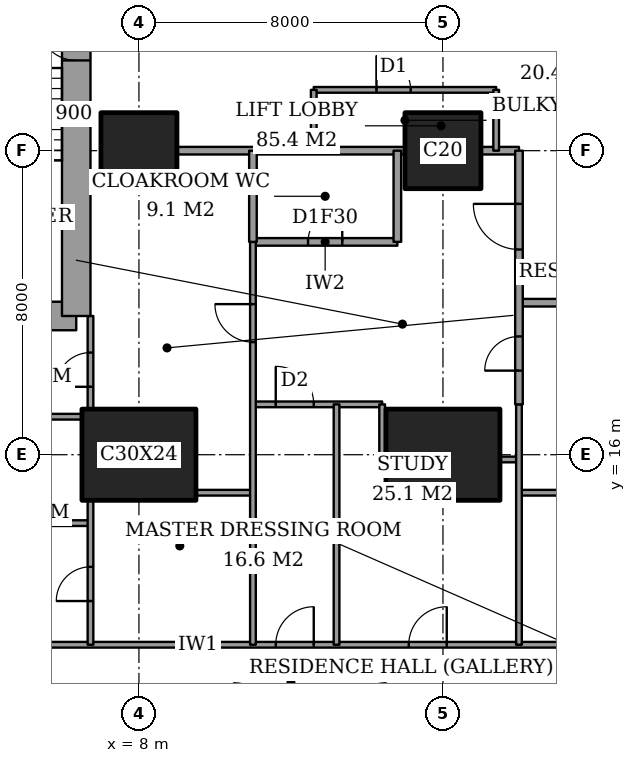
"""IFC4 building model, lengths in metres.
Left out: names, types, materials, properties, quantities, classifications, styles, units other than length and angle.
Written with IfcOpenShell. Run it as: python <this file> out.ifc"""

import sys

from ifc_helpers import new_model, si_unit, direction, frame, frame_2d, origin, origin_2d, place, context, subcontext, project, spatial, rectangle, extrude, element, fill, save


model = new_model("IFC4")
c1 = context("Model", 3, precision=1e-05, world=origin(), true_north=direction((0.0, 1.0)))
c2 = subcontext(c1, "Body", "Model", "MODEL_VIEW")
j1 = project(units=[si_unit("LENGTHUNIT", "METRE"), si_unit("PLANEANGLEUNIT", "RADIAN")], contexts=[c1])
p1 = place(None, origin())
s1 = spatial("IfcSite", under=j1, at=p1, CompositionType="ELEMENT")
p2 = place(p1, origin())
s2 = spatial("IfcBuilding", under=s1, at=p2, CompositionType="ELEMENT")
p3 = place(p2, frame((0.0, 0.0, 69.2)))
s3 = spatial("IfcBuildingStorey", under=s2, at=p3, CompositionType="ELEMENT", Elevation=69.2)
p4 = place(p3, frame((8.0, 16.0, 0.0), z_axis=(0.0, 0.0, 1.0), x_axis=(1.0, 0.0, 0.0)))
e1 = element("IfcColumn", 1, at=p4, inside=s3, PredefinedType="COLUMN", context=c2, shape_type="SweptSolid", body=[
    extrude(rectangle(XDim=3.0, YDim=2.4, at=origin_2d()), origin(), (0.0, 0.0, 1.0), 3.6),
])
p5 = place(p3, frame((8.0, 24.0, 0.0), z_axis=(0.0, 0.0, 1.0), x_axis=(1.0, 0.0, 0.0)))
e2 = element("IfcColumn", 2, at=p5, inside=s3, PredefinedType="COLUMN", context=c2, shape_type="SweptSolid", body=[
    extrude(rectangle(XDim=2.0, YDim=2.0, at=origin_2d()), origin(), (0.0, 0.0, 1.0), 3.6),
])
p6 = place(p3, frame((16.0, 16.0, 0.0), z_axis=(0.0, 0.0, 1.0), x_axis=(1.0, 0.0, 0.0)))
e3 = element("IfcColumn", 3, at=p6, inside=s3, PredefinedType="COLUMN", context=c2, shape_type="SweptSolid", body=[
    extrude(rectangle(XDim=3.0, YDim=2.4, at=origin_2d()), origin(), (0.0, 0.0, 1.0), 3.6),
])
p7 = place(p3, frame((16.0, 24.0, 0.0), z_axis=(0.0, 0.0, 1.0), x_axis=(1.0, 0.0, 0.0)))
e4 = element("IfcColumn", 4, at=p7, inside=s3, PredefinedType="COLUMN", context=c2, shape_type="SweptSolid", body=[
    extrude(rectangle(XDim=2.0, YDim=2.0, at=origin_2d()), origin(), (0.0, 0.0, 1.0), 3.6),
])
p8 = place(p3, frame((1.9, 19.65, 0.0), z_axis=(0.0, 0.0, 1.0), x_axis=(1.0, 0.0, 0.0)))
e5 = element("IfcWall", 5, at=p8, inside=s3, PredefinedType="SHEAR", context=c2, shape_type="SweptSolid", body=[
    extrude(rectangle(XDim=4.45, YDim=0.75, at=frame_2d((2.225, 0.0))), origin(), (0.0, 0.0, 1.0), 3.6),
])
p9 = place(p3, frame((6.35, 19.65, 0.0), z_axis=(0.0, 0.0, 1.0), x_axis=(0.0, 1.0, 0.0)))
e6 = element("IfcWall", 6, at=p9, inside=s3, PredefinedType="SHEAR", context=c2, shape_type="SweptSolid", body=[
    extrude(rectangle(XDim=8.7, YDim=0.75, at=frame_2d((4.35, 0.0))), origin(), (0.0, 0.0, 1.0), 3.6),
])
p10 = place(p9, frame((6.725, 0.0, 0.0)))
e7 = element("IfcOpeningElement", 7, at=p10, cuts=e6, PredefinedType="OPENING", context=c2, shape_type="SweptSolid", body=[
    extrude(rectangle(XDim=1.0, YDim=2.1, at=frame_2d((0.5, 1.05))), frame((0.0, 0.385, 0.0), z_axis=(0.0, -1.0, 0.0), x_axis=(1.0, 0.0, 0.0)), (0.0, 0.0, 1.0), 0.77),
])
p11 = place(p3, frame((-0.45, 11.0, 0.0), z_axis=(0.0, 0.0, 1.0), x_axis=(1.0, 0.0, 0.0)))
e8 = element("IfcWall", 8, at=p11, inside=s3, PredefinedType="PARTITIONING", context=c2, shape_type="SweptSolid", body=[
    extrude(rectangle(XDim=25.011, YDim=0.15, at=frame_2d((12.505, 0.0))), origin(), (0.0, 0.0, 1.0), 3.35),
])
p12 = place(p11, frame((12.05, 0.0, 0.0)))
e9 = element("IfcOpeningElement", 9, at=p12, cuts=e8, PredefinedType="OPENING", context=c2, shape_type="SweptSolid", body=[
    extrude(rectangle(XDim=1.0, YDim=2.1, at=frame_2d((0.5, 1.05))), frame((0.0, 0.085, 0.0), z_axis=(0.0, -1.0, 0.0), x_axis=(1.0, 0.0, 0.0)), (0.0, 0.0, 1.0), 0.17),
])
p13 = place(p11, frame((3.087, 0.0, 0.0)))
e10 = element("IfcOpeningElement", 10, at=p13, cuts=e8, PredefinedType="OPENING", context=c2, shape_type="SweptSolid", body=[
    extrude(rectangle(XDim=1.0, YDim=2.1, at=frame_2d((0.5, 1.05))), frame((0.0, 0.085, 0.0), z_axis=(0.0, -1.0, 0.0), x_axis=(1.0, 0.0, 0.0)), (0.0, 0.0, 1.0), 0.17),
])
p14 = place(p11, frame((15.55, 0.0, 0.0)))
e11 = element("IfcOpeningElement", 11, at=p14, cuts=e8, PredefinedType="OPENING", context=c2, shape_type="SweptSolid", body=[
    extrude(rectangle(XDim=1.0, YDim=2.1, at=frame_2d((0.5, 1.05))), frame((0.0, 0.085, 0.0), z_axis=(0.0, -1.0, 0.0), x_axis=(1.0, 0.0, 0.0)), (0.0, 0.0, 1.0), 0.17),
])
p15 = place(p11, frame((21.175, 0.0, 0.0)))
e12 = element("IfcOpeningElement", 12, at=p15, cuts=e8, PredefinedType="OPENING", context=c2, shape_type="SweptSolid", body=[
    extrude(rectangle(XDim=1.0, YDim=2.1, at=frame_2d((0.5, 1.05))), frame((0.0, 0.085, 0.0), z_axis=(0.0, -1.0, 0.0), x_axis=(1.0, 0.0, 0.0)), (0.0, 0.0, 1.0), 0.17),
])
p16 = place(p3, frame((4.125, 14.2, 0.0), z_axis=(0.0, 0.0, 1.0), x_axis=(1.0, 0.0, 0.0)))
e13 = element("IfcWall", 13, at=p16, inside=s3, PredefinedType="PARTITIONING", context=c2, shape_type="SweptSolid", body=[
    extrude(rectangle(XDim=2.6, YDim=0.15, at=frame_2d((1.3, 0.0))), origin(), (0.0, 0.0, 1.0), 3.35),
])
p17 = place(p3, frame((9.5, 15.0, 0.0), z_axis=(0.0, 0.0, 1.0), x_axis=(1.0, 0.0, 0.0)))
e14 = element("IfcWall", 14, at=p17, inside=s3, PredefinedType="PARTITIONING", context=c2, shape_type="SweptSolid", body=[
    extrude(rectangle(XDim=1.5, YDim=0.15, at=frame_2d((0.75, 0.0))), origin(), (0.0, 0.0, 1.0), 3.35),
])
p18 = place(p3, frame((18.0, 15.0, 0.0), z_axis=(0.0, 0.0, 1.0), x_axis=(1.0, 0.0, 0.0)))
e15 = element("IfcWall", 15, at=p18, inside=s3, PredefinedType="PARTITIONING", context=c2, shape_type="SweptSolid", body=[
    extrude(rectangle(XDim=6.0, YDim=0.15, at=frame_2d((3.0, 0.0))), origin(), (0.0, 0.0, 1.0), 3.35),
])
p19 = place(p3, frame((17.5, 15.875, 0.0), z_axis=(0.0, 0.0, 1.0), x_axis=(1.0, 0.0, 0.0)))
e16 = element("IfcWall", 16, at=p19, inside=s3, PredefinedType="PARTITIONING", context=c2, shape_type="SweptSolid", body=[
    extrude(rectangle(XDim=0.5, YDim=0.15, at=frame_2d((0.25, 0.0))), origin(), (0.0, 0.0, 1.0), 2.634),
])
p20 = place(p3, frame((1.35, 17.0, 0.0), z_axis=(0.0, 0.0, 1.0), x_axis=(1.0, 0.0, 0.0)))
e17 = element("IfcWall", 17, at=p20, inside=s3, PredefinedType="PARTITIONING", context=c2, shape_type="SweptSolid", body=[
    extrude(rectangle(XDim=5.15, YDim=0.15, at=frame_2d((2.575, 0.0))), origin(), (0.0, 0.0, 1.0), 3.35),
])
p21 = place(p3, frame((11.0, 17.325, 0.0), z_axis=(0.0, 0.0, 1.0), x_axis=(1.0, 0.0, 0.0)))
e18 = element("IfcWall", 18, at=p21, inside=s3, PredefinedType="PARTITIONING", context=c2, shape_type="SweptSolid", body=[
    extrude(rectangle(XDim=3.4, YDim=0.15, at=frame_2d((1.7, 0.0))), origin(), (0.0, 0.0, 1.0), 3.35),
])
p22 = place(p21, frame((0.6, 0.0, 0.0)))
e19 = element("IfcOpeningElement", 19, at=p22, cuts=e18, PredefinedType="OPENING", context=c2, shape_type="SweptSolid", body=[
    extrude(rectangle(XDim=1.0, YDim=2.1, at=frame_2d((0.5, 1.05))), frame((0.0, 0.085, 0.0), z_axis=(0.0, -1.0, 0.0), x_axis=(1.0, 0.0, 0.0)), (0.0, 0.0, 1.0), 0.17),
])
p23 = place(p3, frame((18.0, 20.0, 0.0), z_axis=(0.0, 0.0, 1.0), x_axis=(1.0, 0.0, 0.0)))
e20 = element("IfcWall", 20, at=p23, inside=s3, PredefinedType="PARTITIONING", context=c2, shape_type="SweptSolid", body=[
    extrude(rectangle(XDim=6.0, YDim=0.2, at=frame_2d((3.0, 0.0))), origin(), (0.0, 0.0, 1.0), 3.35),
])
p24 = place(p3, frame((11.0, 21.6, 0.0), z_axis=(0.0, 0.0, 1.0), x_axis=(1.0, 0.0, 0.0)))
e21 = element("IfcWall", 21, at=p24, inside=s3, PredefinedType="PARTITIONING", context=c2, shape_type="SweptSolid", body=[
    extrude(rectangle(XDim=3.8, YDim=0.2, at=frame_2d((1.9, 0.0))), origin(), (0.0, 0.0, 1.0), 3.35),
])
p25 = place(p24, frame((1.45, 0.0, 0.0)))
e22 = element("IfcOpeningElement", 22, at=p25, cuts=e21, PredefinedType="OPENING", context=c2, shape_type="SweptSolid", body=[
    extrude(rectangle(XDim=0.9, YDim=2.1, at=frame_2d((0.45, 1.05))), frame((0.0, 0.11, 0.0), z_axis=(0.0, -1.0, 0.0), x_axis=(1.0, 0.0, 0.0)), (0.0, 0.0, 1.0), 0.22),
])
p26 = place(p3, frame((9.0, 24.0, 0.0), z_axis=(0.0, 0.0, 1.0), x_axis=(1.0, 0.0, 0.0)))
e23 = element("IfcWall", 23, at=p26, inside=s3, PredefinedType="PARTITIONING", context=c2, shape_type="SweptSolid", body=[
    extrude(rectangle(XDim=6.0, YDim=0.2, at=frame_2d((3.0, 0.0))), origin(), (0.0, 0.0, 1.0), 3.35),
])
p27 = place(p3, frame((17.0, 24.0, 0.0), z_axis=(0.0, 0.0, 1.0), x_axis=(1.0, 0.0, 0.0)))
e24 = element("IfcWall", 24, at=p27, inside=s3, PredefinedType="PARTITIONING", context=c2, shape_type="SweptSolid", body=[
    extrude(rectangle(XDim=1.0, YDim=0.2, at=frame_2d((0.5, 0.0))), origin(), (0.0, 0.0, 1.0), 3.35),
])
p28 = place(p3, frame((12.6, 25.6, 0.0), z_axis=(0.0, 0.0, 1.0), x_axis=(1.0, 0.0, 0.0)))
e25 = element("IfcWall", 25, at=p28, inside=s3, PredefinedType="PARTITIONING", context=c2, shape_type="SweptSolid", body=[
    extrude(rectangle(XDim=4.8, YDim=0.15, at=frame_2d((2.4, 0.0))), origin(), (0.0, 0.0, 1.0), 3.35),
])
p29 = place(p28, frame((1.65, 0.0, 0.0)))
e26 = element("IfcOpeningElement", 26, at=p29, cuts=e25, PredefinedType="OPENING", context=c2, shape_type="SweptSolid", body=[
    extrude(rectangle(XDim=0.9, YDim=2.1, at=frame_2d((0.45, 1.05))), frame((0.0, 0.085, 0.0), z_axis=(0.0, -1.0, 0.0), x_axis=(1.0, 0.0, 0.0)), (0.0, 0.0, 1.0), 0.17),
])
p30 = place(p3, frame((6.725, 11.0, 0.0), z_axis=(0.0, 0.0, 1.0), x_axis=(0.0, 1.0, 0.0)))
e27 = element("IfcWall", 27, at=p30, inside=s3, PredefinedType="PARTITIONING", context=c2, shape_type="SweptSolid", body=[
    extrude(rectangle(XDim=3.8, YDim=0.15, at=frame_2d((1.9, 0.0))), origin(), (0.0, 0.0, 1.0), 3.35),
])
p31 = place(p30, frame((1.15, 0.0, 0.0)))
e28 = element("IfcOpeningElement", 28, at=p31, cuts=e27, PredefinedType="OPENING", context=c2, shape_type="SweptSolid", body=[
    extrude(rectangle(XDim=0.9, YDim=2.1, at=frame_2d((0.45, 1.05))), frame((0.0, 0.085, 0.0), z_axis=(0.0, -1.0, 0.0), x_axis=(1.0, 0.0, 0.0)), (0.0, 0.0, 1.0), 0.17),
])
p32 = place(p3, frame((6.725, 17.2, 0.0), z_axis=(0.0, 0.0, 1.0), x_axis=(0.0, 1.0, 0.0)))
e29 = element("IfcWall", 29, at=p32, inside=s3, PredefinedType="PARTITIONING", context=c2, shape_type="SweptSolid", body=[
    extrude(rectangle(XDim=2.45, YDim=0.15, at=frame_2d((1.225, 0.0))), origin(), (0.0, 0.0, 1.0), 3.35),
])
p33 = place(p32, frame((0.587, 0.0, 0.0)))
e30 = element("IfcOpeningElement", 30, at=p33, cuts=e29, PredefinedType="OPENING", context=c2, shape_type="SweptSolid", body=[
    extrude(rectangle(XDim=0.9, YDim=2.1, at=frame_2d((0.45, 1.05))), frame((0.0, 0.085, 0.0), z_axis=(0.0, -1.0, 0.0), x_axis=(1.0, 0.0, 0.0)), (0.0, 0.0, 1.0), 0.17),
])
p34 = place(p3, frame((11.0, 21.6, 0.0), z_axis=(0.0, 0.0, 1.0), x_axis=(0.0, 1.0, 0.0)))
e31 = element("IfcWall", 31, at=p34, inside=s3, PredefinedType="PARTITIONING", context=c2, shape_type="SweptSolid", body=[
    extrude(rectangle(XDim=2.4, YDim=0.2, at=frame_2d((1.2, 0.0))), origin(), (0.0, 0.0, 1.0), 3.35),
])
p35 = place(p3, frame((11.0, 11.0, 0.0), z_axis=(0.0, 0.0, 1.0), x_axis=(0.0, 1.0, 0.0)))
e32 = element("IfcWall", 32, at=p35, inside=s3, PredefinedType="PARTITIONING", context=c2, shape_type="SweptSolid", body=[
    extrude(rectangle(XDim=10.6, YDim=0.15, at=frame_2d((5.3, 0.0))), origin(), (0.0, 0.0, 1.0), 3.35),
])
p36 = place(p35, frame((7.962, 0.0, 0.0)))
e33 = element("IfcOpeningElement", 33, at=p36, cuts=e32, PredefinedType="OPENING", context=c2, shape_type="SweptSolid", body=[
    extrude(rectangle(XDim=1.0, YDim=2.1, at=frame_2d((0.5, 1.05))), frame((0.0, 0.085, 0.0), z_axis=(0.0, -1.0, 0.0), x_axis=(1.0, 0.0, 0.0)), (0.0, 0.0, 1.0), 0.17),
])
p37 = place(p3, frame((12.6, 24.0, 0.0), z_axis=(0.0, 0.0, 1.0), x_axis=(0.0, 1.0, 0.0)))
e34 = element("IfcWall", 34, at=p37, inside=s3, PredefinedType="PARTITIONING", context=c2, shape_type="SweptSolid", body=[
    extrude(rectangle(XDim=1.6, YDim=0.15, at=frame_2d((0.8, 0.0))), origin(), (0.0, 0.0, 1.0), 3.35),
])
p38 = place(p3, frame((13.2, 11.0, 0.0), z_axis=(0.0, 0.0, 1.0), x_axis=(0.0, 1.0, 0.0)))
e35 = element("IfcWall", 35, at=p38, inside=s3, PredefinedType="PARTITIONING", context=c2, shape_type="SweptSolid", body=[
    extrude(rectangle(XDim=6.325, YDim=0.15, at=frame_2d((3.163, 0.0))), origin(), (0.0, 0.0, 1.0), 3.35),
])
p39 = place(p3, frame((14.4, 15.875, 0.0), z_axis=(0.0, 0.0, 1.0), x_axis=(0.0, 1.0, 0.0)))
e36 = element("IfcWall", 36, at=p39, inside=s3, PredefinedType="PARTITIONING", context=c2, shape_type="SweptSolid", body=[
    extrude(rectangle(XDim=1.45, YDim=0.15, at=frame_2d((0.725, 0.0))), origin(), (0.0, 0.0, 1.0), 3.35),
])
p40 = place(p3, frame((14.8, 21.6, 0.0), z_axis=(0.0, 0.0, 1.0), x_axis=(0.0, 1.0, 0.0)))
e37 = element("IfcWall", 37, at=p40, inside=s3, PredefinedType="PARTITIONING", context=c2, shape_type="SweptSolid", body=[
    extrude(rectangle(XDim=2.4, YDim=0.2, at=frame_2d((1.2, 0.0))), origin(), (0.0, 0.0, 1.0), 3.35),
])
p41 = place(p3, frame((17.4, 24.0, 0.0), z_axis=(0.0, 0.0, 1.0), x_axis=(0.0, 1.0, 0.0)))
e38 = element("IfcWall", 38, at=p41, inside=s3, PredefinedType="PARTITIONING", context=c2, shape_type="SweptSolid", body=[
    extrude(rectangle(XDim=1.6, YDim=0.15, at=frame_2d((0.8, 0.0))), origin(), (0.0, 0.0, 1.0), 3.35),
])
p42 = place(p3, frame((18.0, 17.325, 0.0), z_axis=(0.0, 0.0, 1.0), x_axis=(0.0, 1.0, 0.0)))
e39 = element("IfcWall", 39, at=p42, inside=s3, PredefinedType="PARTITIONING", context=c2, shape_type="SweptSolid", body=[
    extrude(rectangle(XDim=6.675, YDim=0.2, at=frame_2d((3.337, 0.0))), origin(), (0.0, 0.0, 1.0), 3.35),
])
p43 = place(p42, frame((4.075, 0.0, 0.0)))
e40 = element("IfcOpeningElement", 40, at=p43, cuts=e39, PredefinedType="OPENING", context=c2, shape_type="SweptSolid", body=[
    extrude(rectangle(XDim=1.2, YDim=2.4, at=frame_2d((0.6, 1.2))), frame((0.0, 0.11, 0.0), z_axis=(0.0, -1.0, 0.0), x_axis=(1.0, 0.0, 0.0)), (0.0, 0.0, 1.0), 0.22),
])
p44 = place(p42, frame((0.887, 0.0, 0.0)))
e41 = element("IfcOpeningElement", 41, at=p44, cuts=e39, PredefinedType="OPENING", context=c2, shape_type="SweptSolid", body=[
    extrude(rectangle(XDim=0.9, YDim=2.1, at=frame_2d((0.45, 1.05))), frame((0.0, 0.11, 0.0), z_axis=(0.0, -1.0, 0.0), x_axis=(1.0, 0.0, 0.0)), (0.0, 0.0, 1.0), 0.22),
])
p45 = place(p3, frame((18.0, 11.0, 0.0), z_axis=(0.0, 0.0, 1.0), x_axis=(0.0, 1.0, 0.0)))
e42 = element("IfcWall", 42, at=p45, inside=s3, PredefinedType="PARTITIONING", context=c2, shape_type="SweptSolid", body=[
    extrude(rectangle(XDim=6.325, YDim=0.15, at=frame_2d((3.163, 0.0))), origin(), (0.0, 0.0, 1.0), 3.35),
])
p46 = place(p12, origin())
e43 = element("IfcDoor", 43, at=p46, inside=s3, OperationType="SINGLE_SWING_LEFT", PredefinedType="DOOR", context=c2, shape_type="SweptSolid", body=[
    extrude(rectangle(XDim=1.0, YDim=2.1, at=frame_2d((0.5, 1.05))), frame((0.0, 0.025, 0.0), z_axis=(0.0, -1.0, 0.0), x_axis=(1.0, 0.0, 0.0)), (0.0, 0.0, 1.0), 0.05),
])
fill(e9, e43)
p47 = place(p33, origin())
e44 = element("IfcDoor", 44, at=p47, inside=s3, OperationType="SINGLE_SWING_RIGHT", PredefinedType="DOOR", context=c2, shape_type="SweptSolid", body=[
    extrude(rectangle(XDim=0.9, YDim=2.1, at=frame_2d((0.45, 1.05))), frame((0.0, 0.025, 0.0), z_axis=(0.0, -1.0, 0.0), x_axis=(1.0, 0.0, 0.0)), (0.0, 0.0, 1.0), 0.05),
])
fill(e30, e44)
p48 = place(p31, origin())
e45 = element("IfcDoor", 45, at=p48, inside=s3, OperationType="SINGLE_SWING_RIGHT", PredefinedType="DOOR", context=c2, shape_type="SweptSolid", body=[
    extrude(rectangle(XDim=0.9, YDim=2.1, at=frame_2d((0.45, 1.05))), frame((0.0, 0.025, 0.0), z_axis=(0.0, -1.0, 0.0), x_axis=(1.0, 0.0, 0.0)), (0.0, 0.0, 1.0), 0.05),
])
fill(e28, e45)
p49 = place(p36, origin())
e46 = element("IfcDoor", 46, at=p49, inside=s3, OperationType="SINGLE_SWING_LEFT", PredefinedType="DOOR", context=c2, shape_type="SweptSolid", body=[
    extrude(rectangle(XDim=1.0, YDim=2.1, at=frame_2d((0.5, 1.05))), frame((0.0, 0.025, 0.0), z_axis=(0.0, -1.0, 0.0), x_axis=(1.0, 0.0, 0.0)), (0.0, 0.0, 1.0), 0.05),
])
fill(e33, e46)
p50 = place(p25, origin())
e47 = element("IfcDoor", 47, at=p50, inside=s3, OperationType="SINGLE_SWING_LEFT", PredefinedType="DOOR", context=c2, shape_type="SweptSolid", body=[
    extrude(rectangle(XDim=0.9, YDim=2.1, at=frame_2d((0.45, 1.05))), frame((0.0, 0.025, 0.0), z_axis=(0.0, -1.0, 0.0), x_axis=(1.0, 0.0, 0.0)), (0.0, 0.0, 1.0), 0.05),
])
fill(e22, e47)
p51 = place(p43, origin())
e48 = element("IfcDoor", 48, at=p51, inside=s3, OperationType="SINGLE_SWING_LEFT", PredefinedType="DOOR", context=c2, shape_type="SweptSolid", body=[
    extrude(rectangle(XDim=1.2, YDim=2.4, at=frame_2d((0.6, 1.2))), frame((0.0, 0.025, 0.0), z_axis=(0.0, -1.0, 0.0), x_axis=(1.0, 0.0, 0.0)), (0.0, 0.0, 1.0), 0.05),
])
fill(e40, e48)
p52 = place(p22, origin())
e49 = element("IfcDoor", 49, at=p52, inside=s3, OperationType="SINGLE_SWING_RIGHT", PredefinedType="DOOR", context=c2, shape_type="SweptSolid", body=[
    extrude(rectangle(XDim=1.0, YDim=2.1, at=frame_2d((0.5, 1.05))), frame((0.0, 0.025, 0.0), z_axis=(0.0, -1.0, 0.0), x_axis=(1.0, 0.0, 0.0)), (0.0, 0.0, 1.0), 0.05),
])
fill(e19, e49)
p53 = place(p14, origin())
e50 = element("IfcDoor", 50, at=p53, inside=s3, OperationType="SINGLE_SWING_LEFT", PredefinedType="DOOR", context=c2, shape_type="SweptSolid", body=[
    extrude(rectangle(XDim=1.0, YDim=2.1, at=frame_2d((0.5, 1.05))), frame((0.0, 0.025, 0.0), z_axis=(0.0, -1.0, 0.0), x_axis=(1.0, 0.0, 0.0)), (0.0, 0.0, 1.0), 0.05),
])
fill(e11, e50)
p54 = place(p44, origin())
e51 = element("IfcDoor", 51, at=p54, inside=s3, OperationType="SINGLE_SWING_RIGHT", PredefinedType="DOOR", context=c2, shape_type="SweptSolid", body=[
    extrude(rectangle(XDim=0.9, YDim=2.1, at=frame_2d((0.45, 1.05))), frame((0.0, 0.025, 0.0), z_axis=(0.0, -1.0, 0.0), x_axis=(1.0, 0.0, 0.0)), (0.0, 0.0, 1.0), 0.05),
])
fill(e41, e51)
p55 = place(p29, origin())
e52 = element("IfcDoor", 52, at=p55, inside=s3, OperationType="SINGLE_SWING_RIGHT", PredefinedType="DOOR", context=c2, shape_type="SweptSolid", body=[
    extrude(rectangle(XDim=0.9, YDim=2.1, at=frame_2d((0.45, 1.05))), frame((0.0, 0.025, 0.0), z_axis=(0.0, -1.0, 0.0), x_axis=(1.0, 0.0, 0.0)), (0.0, 0.0, 1.0), 0.05),
])
fill(e26, e52)
p56 = place(p10, origin())
e53 = element("IfcDoor", 53, at=p56, inside=s3, OperationType="SINGLE_SWING_LEFT", PredefinedType="DOOR", context=c2, shape_type="SweptSolid", body=[
    extrude(rectangle(XDim=1.0, YDim=2.1, at=frame_2d((0.5, 1.05))), frame((0.0, 0.025, 0.0), z_axis=(0.0, -1.0, 0.0), x_axis=(1.0, 0.0, 0.0)), (0.0, 0.0, 1.0), 0.05),
])
fill(e7, e53)
save(model, sys.argv[1])
